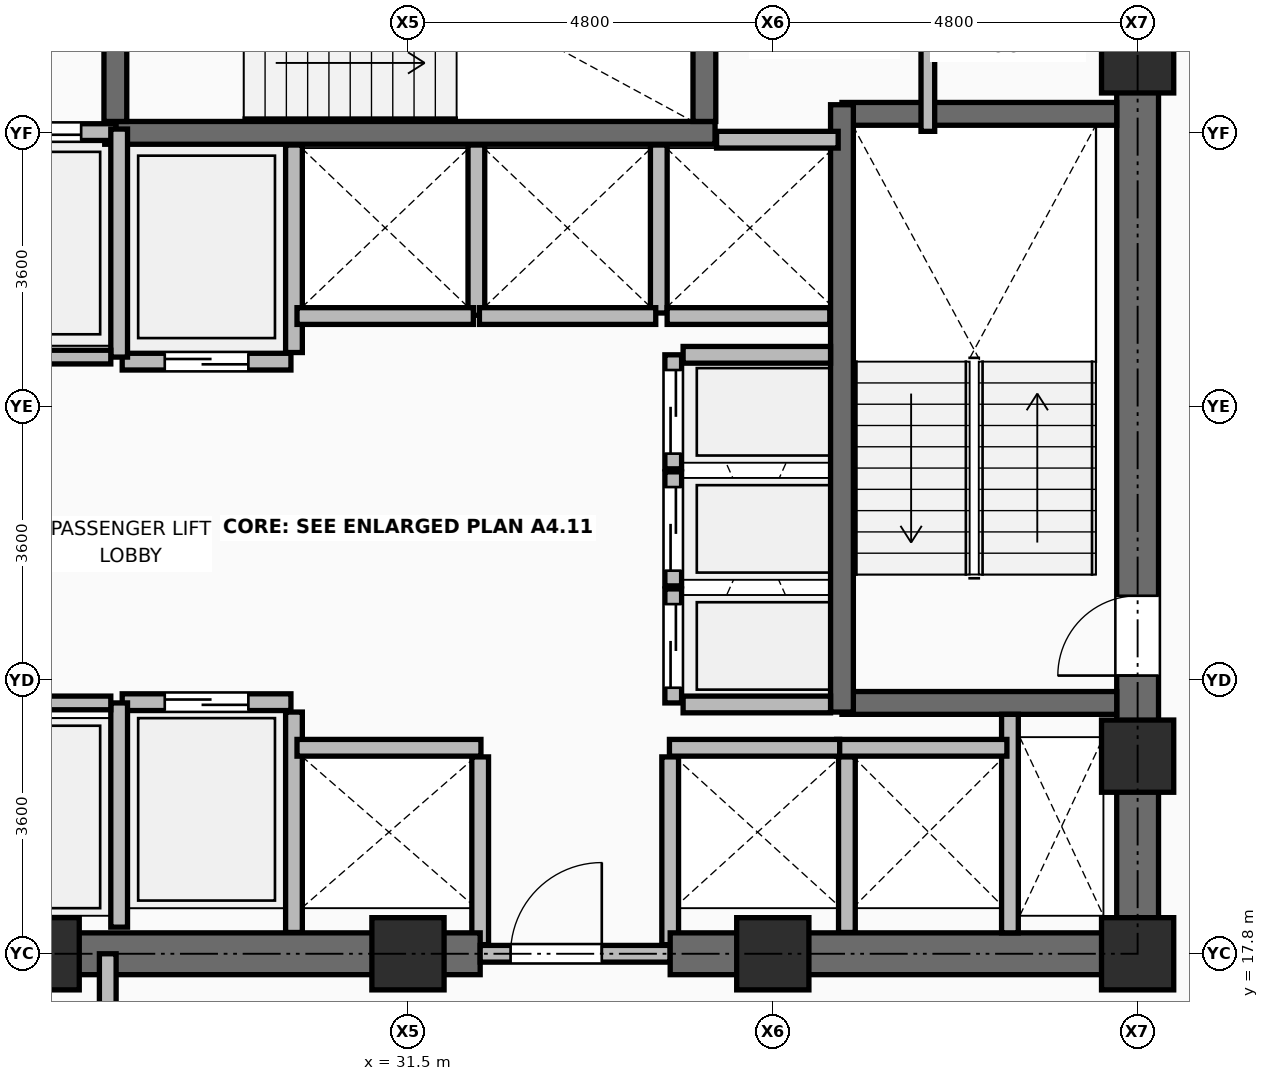
"""IFC4 building model, lengths in metres.
Left out: names, types, materials, properties, quantities, classifications, styles, units other than length and angle.
Written with IfcOpenShell. Run it as: python <this file> out.ifc"""

import sys

from ifc_helpers import new_model, si_unit, direction, frame, frame_2d, origin, origin_2d, place, context, subcontext, project, spatial, rectangle, extrude, element, fill, save


model = new_model("IFC4")
c1 = context("Model", 3, precision=1e-05, world=origin(), true_north=direction((0.0, 1.0)))
c2 = subcontext(c1, "Body", "Model", "MODEL_VIEW")
j1 = project(units=[si_unit("LENGTHUNIT", "METRE"), si_unit("PLANEANGLEUNIT", "RADIAN")], contexts=[c1])
p1 = place(None, origin())
s1 = spatial("IfcSite", under=j1, at=p1, CompositionType="ELEMENT")
p2 = place(p1, origin())
s2 = spatial("IfcBuilding", under=s1, at=p2, CompositionType="ELEMENT")
p3 = place(p2, frame((0.0, 0.0, 157.2)))
s3 = spatial("IfcBuildingStorey", under=s2, at=p3, CompositionType="ELEMENT", Elevation=157.2)
for number, where, z_axis, x_axis in (
    (1, (26.7, 17.8, 0.0), (0.0, 0.0, 1.0), (1.0, 0.0, 0.0)),
    (2, (31.5, 17.8, 0.0), (0.0, 0.0, 1.0), (1.0, 0.0, 0.0)),
    (3, (36.3, 17.8, 0.0), (0.0, 0.0, 1.0), (1.0, 0.0, 0.0)),
    (4, (41.1, 17.8, 0.0), (0.0, 0.0, 1.0), (1.0, 0.0, 0.0)),
    (5, (41.1, 20.4, 0.0), (0.0, 0.0, 1.0), (1.0, 0.0, 0.0)),
    (6, (41.1, 29.6, 0.0), (0.0, 0.0, 1.0), (1.0, 0.0, 0.0)),
):
    element("IfcColumn", number, at=place(p3, frame(where, z_axis=z_axis, x_axis=x_axis)), inside=s3, PredefinedType="COLUMN", context=c2, shape_type="SweptSolid", body=[
        extrude(rectangle(XDim=0.95, YDim=0.95, at=origin_2d()), origin(), (0.0, 0.0, 1.0), 3.75),
    ])
p4 = place(p3, frame((30.0, 18.08, 0.0), z_axis=(0.0, 0.0, 1.0), x_axis=(0.0, 1.0, 0.0)))
e7 = element("IfcWall", 7, at=p4, inside=s3, PredefinedType="PARTITIONING", context=c2, shape_type="SweptSolid", body=[
    extrude(rectangle(XDim=2.9, YDim=0.22, at=frame_2d((1.45, 0.0))), origin(), (0.0, 0.0, 1.0), 3.545),
])
for number, where, z_axis, x_axis in (
    (8, (32.45, 17.92, 0.0), (0.0, 0.0, 1.0), (0.0, 1.0, 0.0)),
    (9, (34.95, 17.92, 0.0), (0.0, 0.0, 1.0), (0.0, 1.0, 0.0)),
):
    element("IfcWall", number, at=place(p3, frame(where, z_axis=z_axis, x_axis=x_axis)), inside=s3, PredefinedType="PARTITIONING", context=c2, shape_type="SweptSolid", body=[
        extrude(rectangle(XDim=2.47, YDim=0.22, at=frame_2d((1.235, 0.0))), origin(), (0.0, 0.0, 1.0), 3.006),
    ])
p5 = place(p3, frame((37.275, 18.08, 0.0), z_axis=(0.0, 0.0, 1.0), x_axis=(0.0, 1.0, 0.0)))
e10 = element("IfcWall", 10, at=p5, inside=s3, PredefinedType="PARTITIONING", context=c2, shape_type="SweptSolid", body=[
    extrude(rectangle(XDim=2.31, YDim=0.22, at=frame_2d((1.155, 0.0))), origin(), (0.0, 0.0, 1.0), 3.545),
])
p6 = place(p3, frame((30.0, 25.71, 0.0), z_axis=(0.0, 0.0, 1.0), x_axis=(0.0, 1.0, 0.0)))
e11 = element("IfcWall", 11, at=p6, inside=s3, PredefinedType="PARTITIONING", context=c2, shape_type="SweptSolid", body=[
    extrude(rectangle(XDim=2.73, YDim=0.22, at=frame_2d((1.365, 0.0))), origin(), (0.0, 0.0, 1.0), 3.545),
])
p7 = place(p3, frame((32.4, 26.2, 0.0), z_axis=(0.0, 0.0, 1.0), x_axis=(0.0, 1.0, 0.0)))
e12 = element("IfcWall", 12, at=p7, inside=s3, PredefinedType="PARTITIONING", context=c2, shape_type="SweptSolid", body=[
    extrude(rectangle(XDim=2.24, YDim=0.22, at=frame_2d((1.12, 0.0))), origin(), (0.0, 0.0, 1.0), 3.545),
])
p8 = place(p3, frame((34.8, 26.23, 0.0), z_axis=(0.0, 0.0, 1.0), x_axis=(0.0, 1.0, 0.0)))
e13 = element("IfcWall", 13, at=p8, inside=s3, PredefinedType="PARTITIONING", context=c2, shape_type="SweptSolid", body=[
    extrude(rectangle(XDim=2.21, YDim=0.22, at=frame_2d((1.105, 0.0))), origin(), (0.0, 0.0, 1.0), 3.545),
])
p9 = place(p3, frame((34.91, 26.19, 0.0), z_axis=(0.0, 0.0, 1.0), x_axis=(1.0, 0.0, 0.0)))
e14 = element("IfcWall", 14, at=p9, inside=s3, PredefinedType="PARTITIONING", context=c2, shape_type="SweptSolid", body=[
    extrude(rectangle(XDim=2.14, YDim=0.22, at=frame_2d((1.07, 0.0))), origin(), (0.0, 0.0, 1.0), 3.545),
])
p10 = place(p3, frame((25.55, 17.8, 0.0), z_axis=(0.0, 0.0, 1.0), x_axis=(1.0, 0.0, 0.0)))
e15 = element("IfcWall", 15, at=p10, inside=s3, PredefinedType="SHEAR", context=c2, shape_type="SweptSolid", body=[
    extrude(rectangle(XDim=6.9, YDim=0.55, at=frame_2d((3.45, 0.0))), origin(), (0.0, 0.0, 1.0), 3.57),
])
p11 = place(p3, frame((32.45, 17.8, 0.0), z_axis=(0.0, 0.0, 1.0), x_axis=(1.0, 0.0, 0.0)))
e16 = element("IfcWall", 16, at=p11, inside=s3, PredefinedType="PARTITIONING", context=c2, shape_type="SweptSolid", body=[
    extrude(rectangle(XDim=2.5, YDim=0.22, at=frame_2d((1.25, 0.0))), origin(), (0.0, 0.0, 1.0), 3.006),
])
p12 = place(p11, frame((0.4, 0.0, 0.0)))
e17 = element("IfcOpeningElement", 17, at=p12, cuts=e16, PredefinedType="OPENING", context=c2, shape_type="SweptSolid", body=[
    extrude(rectangle(XDim=1.2, YDim=2.1, at=frame_2d((0.6, 1.05))), frame((0.0, 0.12, 0.0), z_axis=(0.0, -1.0, 0.0), x_axis=(1.0, 0.0, 0.0)), (0.0, 0.0, 1.0), 0.24),
])
p13 = place(p3, frame((34.95, 17.8, 0.0), z_axis=(0.0, 0.0, 1.0), x_axis=(1.0, 0.0, 0.0)))
e18 = element("IfcWall", 18, at=p13, inside=s3, PredefinedType="SHEAR", context=c2, shape_type="SweptSolid", body=[
    extrude(rectangle(XDim=6.425, YDim=0.55, at=frame_2d((3.212, 0.0))), origin(), (0.0, 0.0, 1.0), 3.57),
])
p14 = place(p3, frame((41.1, 18.075, 0.0), z_axis=(0.0, 0.0, 1.0), x_axis=(0.0, 1.0, 0.0)))
e19 = element("IfcWall", 19, at=p14, inside=s3, PredefinedType="SHEAR", context=c2, shape_type="SweptSolid", body=[
    extrude(rectangle(XDim=14.1, YDim=0.55, at=frame_2d((7.05, 0.0))), origin(), (0.0, 0.0, 1.0), 3.57),
])
p15 = place(p14, frame((3.385, 0.0, 0.0)))
e20 = element("IfcOpeningElement", 20, at=p15, cuts=e19, PredefinedType="OPENING", context=c2, shape_type="SweptSolid", body=[
    extrude(rectangle(XDim=1.05, YDim=2.1, at=frame_2d((0.525, 1.05))), frame((0.0, 0.285, 0.0), z_axis=(0.0, -1.0, 0.0), x_axis=(1.0, 0.0, 0.0)), (0.0, 0.0, 1.0), 0.57),
])
for number, where, z_axis, x_axis in (
    (21, (37.21, 21.1, 0.0), (0.0, 0.0, 1.0), (1.0, 0.0, 0.0)),
    (22, (37.21, 28.85, 0.0), (0.0, 0.0, 1.0), (1.0, 0.0, 0.0)),
):
    element("IfcWall", number, at=place(p3, frame(where, z_axis=z_axis, x_axis=x_axis)), inside=s3, PredefinedType="SHEAR", context=c2, shape_type="SweptSolid", body=[
        extrude(rectangle(XDim=3.615, YDim=0.3, at=frame_2d((1.808, 0.0))), origin(), (0.0, 0.0, 1.0), 3.57),
    ])
p16 = place(p3, frame((37.21, 20.98, 0.0), z_axis=(0.0, 0.0, 1.0), x_axis=(0.0, 1.0, 0.0)))
e23 = element("IfcWall", 23, at=p16, inside=s3, PredefinedType="SHEAR", context=c2, shape_type="SweptSolid", body=[
    extrude(rectangle(XDim=7.99, YDim=0.3, at=frame_2d((3.995, 0.0))), origin(), (0.0, 0.0, 1.0), 3.57),
])
p17 = place(p3, frame((27.51, 28.6, 0.0), z_axis=(0.0, 0.0, 1.0), x_axis=(1.0, 0.0, 0.0)))
e24 = element("IfcWall", 24, at=p17, inside=s3, PredefinedType="SHEAR", context=c2, shape_type="SweptSolid", body=[
    extrude(rectangle(XDim=8.03, YDim=0.3, at=frame_2d((4.015, 0.0))), origin(), (0.0, 0.0, 1.0), 3.57),
])
p18 = place(p3, frame((27.65, 28.75, 0.0), z_axis=(0.0, 0.0, 1.0), x_axis=(0.0, 1.0, 0.0)))
e25 = element("IfcWall", 25, at=p18, inside=s3, PredefinedType="SHEAR", context=c2, shape_type="SweptSolid", body=[
    extrude(rectangle(XDim=3.425, YDim=0.3, at=frame_2d((1.712, 0.0))), origin(), (0.0, 0.0, 1.0), 3.57),
])
p19 = place(p18, frame((1.0, 0.0, 0.0)))
e26 = element("IfcOpeningElement", 26, at=p19, cuts=e25, PredefinedType="OPENING", context=c2, shape_type="SweptSolid", body=[
    extrude(rectangle(XDim=1.05, YDim=2.1, at=frame_2d((0.525, 1.05))), frame((0.0, 0.16, 0.0), z_axis=(0.0, -1.0, 0.0), x_axis=(1.0, 0.0, 0.0)), (0.0, 0.0, 1.0), 0.32),
])
p20 = place(p3, frame((35.4, 28.75, 0.0), z_axis=(0.0, 0.0, 1.0), x_axis=(0.0, 1.0, 0.0)))
e27 = element("IfcWall", 27, at=p20, inside=s3, PredefinedType="SHEAR", context=c2, shape_type="SweptSolid", body=[
    extrude(rectangle(XDim=3.425, YDim=0.3, at=frame_2d((1.712, 0.0))), origin(), (0.0, 0.0, 1.0), 3.57),
])
p21 = place(p3, frame((39.42, 18.075, 0.0), z_axis=(0.0, 0.0, 1.0), x_axis=(0.0, 1.0, 0.0)))
e28 = element("IfcWall", 28, at=p21, inside=s3, PredefinedType="PARTITIONING", context=c2, shape_type="SweptSolid", body=[
    extrude(rectangle(XDim=2.875, YDim=0.22, at=frame_2d((1.438, 0.0))), origin(), (0.0, 0.0, 1.0), 3.55),
])
p22 = place(p3, frame((25.64, 28.61, 0.0), z_axis=(0.0, 0.0, 1.0), x_axis=(1.0, 0.0, 0.0)))
e29 = element("IfcWall", 29, at=p22, inside=s3, PredefinedType="PARTITIONING", context=c2, shape_type="SweptSolid", body=[
    extrude(rectangle(XDim=2.02, YDim=0.22, at=frame_2d((1.01, 0.0))), origin(), (0.0, 0.0, 1.0), 3.55),
])
p23 = place(p22, frame((0.46, 0.0, 0.0)))
e30 = element("IfcOpeningElement", 30, at=p23, cuts=e29, PredefinedType="OPENING", context=c2, shape_type="SweptSolid", body=[
    extrude(rectangle(XDim=1.1, YDim=2.2, at=frame_2d((0.55, 1.1))), frame((0.0, 0.12, 0.0), z_axis=(0.0, -1.0, 0.0), x_axis=(1.0, 0.0, 0.0)), (0.0, 0.0, 1.0), 0.24),
])
p24 = place(p3, frame((27.74, 21.11, 0.0), z_axis=(0.0, 0.0, 1.0), x_axis=(1.0, 0.0, 0.0)))
e31 = element("IfcWall", 31, at=p24, inside=s3, PredefinedType="PARTITIONING", context=c2, shape_type="SweptSolid", body=[
    extrude(rectangle(XDim=2.22, YDim=0.22, at=frame_2d((1.11, 0.0))), origin(), (0.0, 0.0, 1.0), 3.55),
])
p25 = place(p24, frame((0.56, 0.0, 0.0)))
e32 = element("IfcOpeningElement", 32, at=p25, cuts=e31, PredefinedType="OPENING", context=c2, shape_type="SweptSolid", body=[
    extrude(rectangle(XDim=1.1, YDim=2.2, at=frame_2d((0.55, 1.1))), frame((0.0, 0.12, 0.0), z_axis=(0.0, -1.0, 0.0), x_axis=(1.0, 0.0, 0.0)), (0.0, 0.0, 1.0), 0.24),
])
p26 = place(p3, frame((27.74, 25.59, 0.0), z_axis=(0.0, 0.0, 1.0), x_axis=(1.0, 0.0, 0.0)))
e33 = element("IfcWall", 33, at=p26, inside=s3, PredefinedType="PARTITIONING", context=c2, shape_type="SweptSolid", body=[
    extrude(rectangle(XDim=2.22, YDim=0.22, at=frame_2d((1.11, 0.0))), origin(), (0.0, 0.0, 1.0), 3.55),
])
p27 = place(p26, frame((0.56, 0.0, 0.0)))
e34 = element("IfcOpeningElement", 34, at=p27, cuts=e33, PredefinedType="OPENING", context=c2, shape_type="SweptSolid", body=[
    extrude(rectangle(XDim=1.1, YDim=2.2, at=frame_2d((0.55, 1.1))), frame((0.0, 0.12, 0.0), z_axis=(0.0, -1.0, 0.0), x_axis=(1.0, 0.0, 0.0)), (0.0, 0.0, 1.0), 0.24),
])
p28 = place(p3, frame((30.04, 20.51, 0.0), z_axis=(0.0, 0.0, 1.0), x_axis=(1.0, 0.0, 0.0)))
e35 = element("IfcWall", 35, at=p28, inside=s3, PredefinedType="PARTITIONING", context=c2, shape_type="SweptSolid", body=[
    extrude(rectangle(XDim=2.42, YDim=0.22, at=frame_2d((1.21, 0.0))), origin(), (0.0, 0.0, 1.0), 3.55),
])
for number, where, z_axis, x_axis in (
    (36, (37.14, 20.51, 0.0), (0.0, 0.0, 1.0), (1.0, 0.0, 0.0)),
    (37, (34.94, 20.51, 0.0), (0.0, 0.0, 1.0), (1.0, 0.0, 0.0)),
):
    element("IfcWall", number, at=place(p3, frame(where, z_axis=z_axis, x_axis=x_axis)), inside=s3, PredefinedType="PARTITIONING", context=c2, shape_type="SweptSolid", body=[
        extrude(rectangle(XDim=2.24, YDim=0.22, at=frame_2d((1.12, 0.0))), origin(), (0.0, 0.0, 1.0), 3.55),
    ])
for number, where, z_axis, x_axis in (
    (38, (30.04, 26.19, 0.0), (0.0, 0.0, 1.0), (1.0, 0.0, 0.0)),
    (39, (32.44, 26.19, 0.0), (0.0, 0.0, 1.0), (1.0, 0.0, 0.0)),
):
    element("IfcWall", number, at=place(p3, frame(where, z_axis=z_axis, x_axis=x_axis)), inside=s3, PredefinedType="PARTITIONING", context=c2, shape_type="SweptSolid", body=[
        extrude(rectangle(XDim=2.32, YDim=0.22, at=frame_2d((1.16, 0.0))), origin(), (0.0, 0.0, 1.0), 3.55),
    ])
p29 = place(p3, frame((35.56, 28.51, 0.0), z_axis=(0.0, 0.0, 1.0), x_axis=(1.0, 0.0, 0.0)))
e40 = element("IfcWall", 40, at=p29, inside=s3, PredefinedType="PARTITIONING", context=c2, shape_type="SweptSolid", body=[
    extrude(rectangle(XDim=1.6, YDim=0.22, at=frame_2d((0.8, 0.0))), origin(), (0.0, 0.0, 1.0), 3.55),
])
p30 = place(p3, frame((34.99, 21.1, 0.0), z_axis=(0.0, 0.0, 1.0), x_axis=(0.0, 1.0, 0.0)))
e41 = element("IfcWall", 41, at=p30, inside=s3, PredefinedType="PARTITIONING", context=c2, shape_type="SweptSolid", body=[
    extrude(rectangle(XDim=1.5, YDim=0.22, at=frame_2d((0.75, 0.0))), origin(), (0.0, 0.0, 1.0), 3.55),
])
p31 = place(p30, frame((0.2, 0.0, 0.0)))
e42 = element("IfcOpeningElement", 42, at=p31, cuts=e41, PredefinedType="OPENING", context=c2, shape_type="SweptSolid", body=[
    extrude(rectangle(XDim=1.1, YDim=2.2, at=frame_2d((0.55, 1.1))), frame((0.0, 0.12, 0.0), z_axis=(0.0, -1.0, 0.0), x_axis=(1.0, 0.0, 0.0)), (0.0, 0.0, 1.0), 0.24),
])
p32 = place(p3, frame((34.99, 22.64, 0.0), z_axis=(0.0, 0.0, 1.0), x_axis=(0.0, 1.0, 0.0)))
e43 = element("IfcWall", 43, at=p32, inside=s3, PredefinedType="PARTITIONING", context=c2, shape_type="SweptSolid", body=[
    extrude(rectangle(XDim=1.5, YDim=0.22, at=frame_2d((0.75, 0.0))), origin(), (0.0, 0.0, 1.0), 3.55),
])
p33 = place(p32, frame((0.2, 0.0, 0.0)))
e44 = element("IfcOpeningElement", 44, at=p33, cuts=e43, PredefinedType="OPENING", context=c2, shape_type="SweptSolid", body=[
    extrude(rectangle(XDim=1.1, YDim=2.2, at=frame_2d((0.55, 1.1))), frame((0.0, 0.12, 0.0), z_axis=(0.0, -1.0, 0.0), x_axis=(1.0, 0.0, 0.0)), (0.0, 0.0, 1.0), 0.24),
])
p34 = place(p3, frame((34.99, 24.18, 0.0), z_axis=(0.0, 0.0, 1.0), x_axis=(0.0, 1.0, 0.0)))
e45 = element("IfcWall", 45, at=p34, inside=s3, PredefinedType="PARTITIONING", context=c2, shape_type="SweptSolid", body=[
    extrude(rectangle(XDim=1.5, YDim=0.22, at=frame_2d((0.75, 0.0))), origin(), (0.0, 0.0, 1.0), 3.55),
])
p35 = place(p34, frame((0.2, 0.0, 0.0)))
e46 = element("IfcOpeningElement", 46, at=p35, cuts=e45, PredefinedType="OPENING", context=c2, shape_type="SweptSolid", body=[
    extrude(rectangle(XDim=1.1, YDim=2.2, at=frame_2d((0.55, 1.1))), frame((0.0, 0.12, 0.0), z_axis=(0.0, -1.0, 0.0), x_axis=(1.0, 0.0, 0.0)), (0.0, 0.0, 1.0), 0.24),
])
p36 = place(p3, frame((27.7, 18.15, 0.0), z_axis=(0.0, 0.0, 1.0), x_axis=(0.0, 1.0, 0.0)))
e47 = element("IfcWall", 47, at=p36, inside=s3, PredefinedType="PARTITIONING", context=c2, shape_type="SweptSolid", body=[
    extrude(rectangle(XDim=2.95, YDim=0.22, at=frame_2d((1.475, 0.0))), origin(), (0.0, 0.0, 1.0), 3.55),
])
p37 = place(p3, frame((27.7, 25.65, 0.0), z_axis=(0.0, 0.0, 1.0), x_axis=(0.0, 1.0, 0.0)))
e48 = element("IfcWall", 48, at=p37, inside=s3, PredefinedType="PARTITIONING", context=c2, shape_type="SweptSolid", body=[
    extrude(rectangle(XDim=3.0, YDim=0.22, at=frame_2d((1.5, 0.0))), origin(), (0.0, 0.0, 1.0), 3.55),
])
for number, where, z_axis, x_axis in (
    (49, (35.12, 21.08, 0.0), (0.0, 0.0, 1.0), (1.0, 0.0, 0.0)),
    (50, (35.12, 25.68, 0.0), (0.0, 0.0, 1.0), (1.0, 0.0, 0.0)),
):
    element("IfcWall", number, at=place(p3, frame(where, z_axis=z_axis, x_axis=x_axis)), inside=s3, PredefinedType="PARTITIONING", context=c2, shape_type="SweptSolid", body=[
        extrude(rectangle(XDim=1.94, YDim=0.22, at=frame_2d((0.97, 0.0))), origin(), (0.0, 0.0, 1.0), 3.55),
    ])
for number, where, z_axis, x_axis in (
    (51, (25.89, 21.1, 0.0), (0.0, 0.0, 1.0), (1.0, 0.0, 0.0)),
    (52, (25.89, 25.65, 0.0), (0.0, 0.0, 1.0), (1.0, 0.0, 0.0)),
):
    element("IfcWall", number, at=place(p3, frame(where, z_axis=z_axis, x_axis=x_axis)), inside=s3, PredefinedType="PARTITIONING", context=c2, shape_type="SweptSolid", body=[
        extrude(rectangle(XDim=1.7, YDim=0.18, at=frame_2d((0.85, 0.0))), origin(), (0.0, 0.0, 1.0), 3.55),
    ])
p38 = place(p3, frame((27.55, 14.35, 0.0), z_axis=(0.0, 0.0, 1.0), x_axis=(0.0, 1.0, 0.0)))
e53 = element("IfcWall", 53, at=p38, inside=s3, PredefinedType="PARTITIONING", context=c2, shape_type="SweptSolid", body=[
    extrude(rectangle(XDim=3.45, YDim=0.22, at=frame_2d((1.725, 0.0))), origin(), (0.0, 0.0, 1.0), 3.006),
])
p39 = place(p38, frame((1.175, 0.0, 0.0)))
e54 = element("IfcOpeningElement", 54, at=p39, cuts=e53, PredefinedType="OPENING", context=c2, shape_type="SweptSolid", body=[
    extrude(rectangle(XDim=1.1, YDim=2.1, at=frame_2d((0.55, 1.05))), frame((0.0, 0.12, 0.0), z_axis=(0.0, -1.0, 0.0), x_axis=(1.0, 0.0, 0.0)), (0.0, 0.0, 1.0), 0.24),
])
p40 = place(p3, frame((38.34, 28.62, 0.0), z_axis=(0.0, 0.0, 1.0), x_axis=(0.0, 1.0, 0.0)))
e55 = element("IfcWall", 55, at=p40, inside=s3, PredefinedType="PARTITIONING", context=c2, shape_type="SweptSolid", body=[
    extrude(rectangle(XDim=3.555, YDim=0.18, at=frame_2d((1.777, 0.0))), origin(), (0.0, 0.0, 1.0), 3.55),
])
p41 = place(p12, origin())
e56 = element("IfcDoor", 56, at=p41, inside=s3, OperationType="SINGLE_SWING_RIGHT", PredefinedType="DOOR", context=c2, shape_type="SweptSolid", body=[
    extrude(rectangle(XDim=1.2, YDim=2.1, at=frame_2d((0.6, 1.05))), frame((0.0, 0.025, 0.0), z_axis=(0.0, -1.0, 0.0), x_axis=(1.0, 0.0, 0.0)), (0.0, 0.0, 1.0), 0.05),
])
fill(e17, e56)
p42 = place(p15, origin())
e57 = element("IfcDoor", 57, at=p42, inside=s3, OperationType="SINGLE_SWING_LEFT", PredefinedType="DOOR", context=c2, shape_type="SweptSolid", body=[
    extrude(rectangle(XDim=1.05, YDim=2.1, at=frame_2d((0.525, 1.05))), frame((0.0, 0.025, 0.0), z_axis=(0.0, -1.0, 0.0), x_axis=(1.0, 0.0, 0.0)), (0.0, 0.0, 1.0), 0.05),
])
fill(e20, e57)
p43 = place(p23, origin())
e58 = element("IfcDoor", 58, at=p43, inside=s3, OperationType="DOUBLE_DOOR_SLIDING", PredefinedType="DOOR", context=c2, shape_type="SweptSolid", body=[
    extrude(rectangle(XDim=1.1, YDim=2.2, at=frame_2d((0.55, 1.1))), frame((0.0, 0.025, 0.0), z_axis=(0.0, -1.0, 0.0), x_axis=(1.0, 0.0, 0.0)), (0.0, 0.0, 1.0), 0.05),
])
fill(e30, e58)
p44 = place(p25, origin())
e59 = element("IfcDoor", 59, at=p44, inside=s3, OperationType="DOUBLE_DOOR_SLIDING", PredefinedType="DOOR", context=c2, shape_type="SweptSolid", body=[
    extrude(rectangle(XDim=1.1, YDim=2.2, at=frame_2d((0.55, 1.1))), frame((0.0, 0.025, 0.0), z_axis=(0.0, -1.0, 0.0), x_axis=(1.0, 0.0, 0.0)), (0.0, 0.0, 1.0), 0.05),
])
fill(e32, e59)
p45 = place(p27, frame((1.1, 0.0, 0.0), z_axis=(0.0, 0.0, 1.0), x_axis=(-1.0, 0.0, 0.0)))
e60 = element("IfcDoor", 60, at=p45, inside=s3, OperationType="DOUBLE_DOOR_SLIDING", PredefinedType="DOOR", context=c2, shape_type="SweptSolid", body=[
    extrude(rectangle(XDim=1.1, YDim=2.2, at=frame_2d((0.55, 1.1))), frame((0.0, 0.025, 0.0), z_axis=(0.0, -1.0, 0.0), x_axis=(1.0, 0.0, 0.0)), (0.0, 0.0, 1.0), 0.05),
])
fill(e34, e60)
p46 = place(p31, origin())
e61 = element("IfcDoor", 61, at=p46, inside=s3, OperationType="DOUBLE_DOOR_SLIDING", PredefinedType="DOOR", context=c2, shape_type="SweptSolid", body=[
    extrude(rectangle(XDim=1.1, YDim=2.2, at=frame_2d((0.55, 1.1))), frame((0.0, 0.025, 0.0), z_axis=(0.0, -1.0, 0.0), x_axis=(1.0, 0.0, 0.0)), (0.0, 0.0, 1.0), 0.05),
])
fill(e42, e61)
p47 = place(p33, origin())
e62 = element("IfcDoor", 62, at=p47, inside=s3, OperationType="DOUBLE_DOOR_SLIDING", PredefinedType="DOOR", context=c2, shape_type="SweptSolid", body=[
    extrude(rectangle(XDim=1.1, YDim=2.2, at=frame_2d((0.55, 1.1))), frame((0.0, 0.025, 0.0), z_axis=(0.0, -1.0, 0.0), x_axis=(1.0, 0.0, 0.0)), (0.0, 0.0, 1.0), 0.05),
])
fill(e44, e62)
p48 = place(p35, origin())
e63 = element("IfcDoor", 63, at=p48, inside=s3, OperationType="DOUBLE_DOOR_SLIDING", PredefinedType="DOOR", context=c2, shape_type="SweptSolid", body=[
    extrude(rectangle(XDim=1.1, YDim=2.2, at=frame_2d((0.55, 1.1))), frame((0.0, 0.025, 0.0), z_axis=(0.0, -1.0, 0.0), x_axis=(1.0, 0.0, 0.0)), (0.0, 0.0, 1.0), 0.05),
])
fill(e46, e63)
save(model, sys.argv[1])
